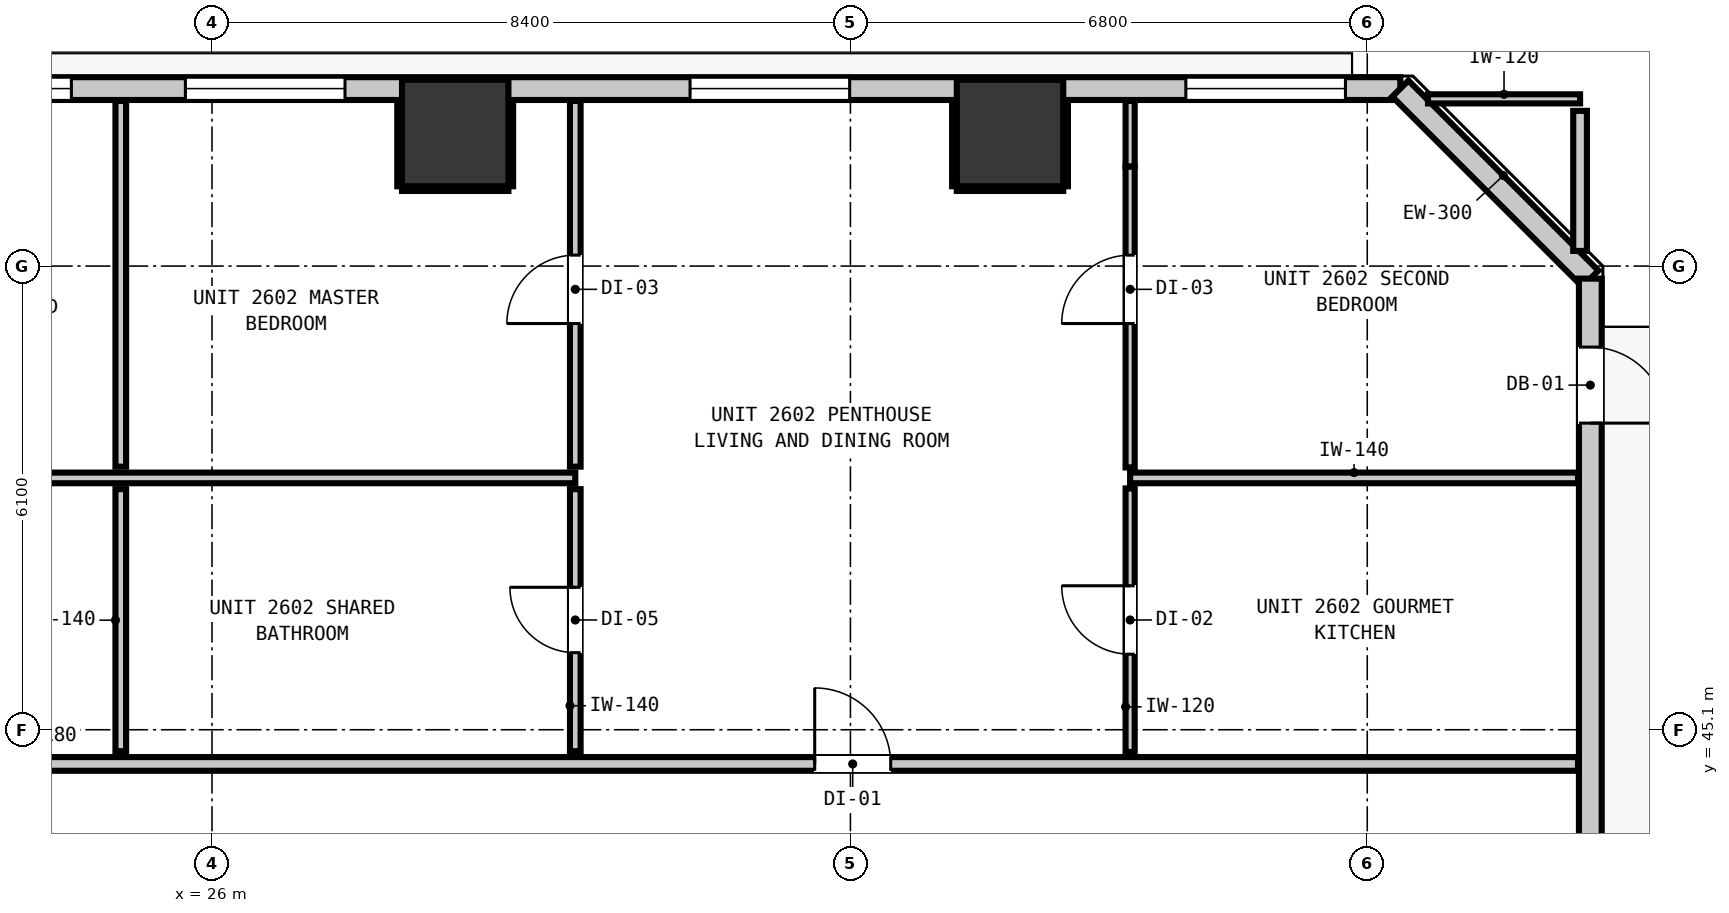
"""IFC4 building model, lengths in metres.
Left out: names, types, materials, properties, quantities, classifications, styles, units other than length and angle.
Written with IfcOpenShell. Run it as: python <this file> out.ifc"""

import sys

from ifc_helpers import new_model, si_unit, direction, frame, frame_2d, origin, origin_2d, place, context, subcontext, project, spatial, rectangle, extrude, element, fill, save


model = new_model("IFC4")
c1 = context("Model", 3, precision=1e-05, world=origin(), true_north=direction((0.0, 1.0)))
c2 = subcontext(c1, "Body", "Model", "MODEL_VIEW")
j1 = project(units=[si_unit("LENGTHUNIT", "METRE"), si_unit("PLANEANGLEUNIT", "RADIAN")], contexts=[c1])
p1 = place(None, origin())
s1 = spatial("IfcSite", under=j1, at=p1, CompositionType="ELEMENT")
p2 = place(p1, origin())
s2 = spatial("IfcBuilding", under=s1, at=p2, CompositionType="ELEMENT")
p3 = place(p2, frame((0.0, 0.0, 92.8)))
s3 = spatial("IfcBuildingStorey", under=s2, at=p3, CompositionType="ELEMENT", Elevation=92.8)
for number, where, z_axis, x_axis in (
    (1, (29.2, 52.95, 0.0), (0.0, 0.0, 1.0), (1.0, 0.0, 0.0)),
    (2, (36.5, 52.95, 0.0), (0.0, 0.0, 1.0), (1.0, 0.0, 0.0)),
):
    element("IfcColumn", number, at=place(p3, frame(where, z_axis=z_axis, x_axis=x_axis)), inside=s3, PredefinedType="COLUMN", context=c2, shape_type="SweptSolid", body=[
        extrude(rectangle(XDim=1.4, YDim=1.4, at=origin_2d()), origin(), (0.0, 0.0, 1.0), 3.32),
    ])
p4 = place(p3, frame((4.165, 53.535, 0.0), z_axis=(0.0, 0.0, 1.0), x_axis=(1.0, 0.0, 0.0)))
e3 = element("IfcWall", 3, at=p4, inside=s3, PredefinedType="STANDARD", context=c2, shape_type="SweptSolid", body=[
    extrude(rectangle(XDim=37.47, YDim=0.3, at=frame_2d((18.735, 0.0))), origin(), (0.0, 0.0, 1.0), 3.06),
])
p5 = place(p4, frame((0.901, 0.0, 0.0)))
e4 = element("IfcOpeningElement", 4, at=p5, cuts=e3, PredefinedType="OPENING", context=c2, shape_type="SweptSolid", body=[
    extrude(rectangle(XDim=1.0, YDim=2.15, at=frame_2d((0.5, 1.075))), frame((0.0, 0.16, 0.0), z_axis=(0.0, -1.0, 0.0), x_axis=(1.0, 0.0, 0.0)), (0.0, 0.0, 1.0), 0.32),
])
p6 = place(p4, frame((5.078, 0.0, 0.85)))
e5 = element("IfcOpeningElement", 5, at=p6, cuts=e3, PredefinedType="OPENING", context=c2, shape_type="SweptSolid", body=[
    extrude(rectangle(XDim=2.1, YDim=1.9, at=frame_2d((1.05, 0.95))), frame((0.0, 0.16, 0.0), z_axis=(0.0, -1.0, 0.0), x_axis=(1.0, 0.0, 0.0)), (0.0, 0.0, 1.0), 0.32),
])
p7 = place(p4, frame((2.286, 0.0, 0.85)))
e6 = element("IfcOpeningElement", 6, at=p7, cuts=e3, PredefinedType="OPENING", context=c2, shape_type="SweptSolid", body=[
    extrude(rectangle(XDim=1.05, YDim=1.65, at=frame_2d((0.525, 0.825))), frame((0.0, 0.16, 0.0), z_axis=(0.0, -1.0, 0.0), x_axis=(1.0, 0.0, 0.0)), (0.0, 0.0, 1.0), 0.32),
])
p8 = place(p4, frame((17.885, 0.0, 0.85)))
e7 = element("IfcOpeningElement", 7, at=p8, cuts=e3, PredefinedType="OPENING", context=c2, shape_type="SweptSolid", body=[
    extrude(rectangle(XDim=2.1, YDim=1.9, at=frame_2d((1.05, 0.95))), frame((0.0, 0.16, 0.0), z_axis=(0.0, -1.0, 0.0), x_axis=(1.0, 0.0, 0.0)), (0.0, 0.0, 1.0), 0.32),
])
p9 = place(p4, frame((28.125, 0.0, 0.85)))
e8 = element("IfcOpeningElement", 8, at=p9, cuts=e3, PredefinedType="OPENING", context=c2, shape_type="SweptSolid", body=[
    extrude(rectangle(XDim=2.1, YDim=1.9, at=frame_2d((1.05, 0.95))), frame((0.0, 0.16, 0.0), z_axis=(0.0, -1.0, 0.0), x_axis=(1.0, 0.0, 0.0)), (0.0, 0.0, 1.0), 0.32),
])
p10 = place(p4, frame((21.485, 0.0, 0.85)))
e9 = element("IfcOpeningElement", 9, at=p10, cuts=e3, PredefinedType="OPENING", context=c2, shape_type="SweptSolid", body=[
    extrude(rectangle(XDim=2.1, YDim=1.9, at=frame_2d((1.05, 0.95))), frame((0.0, 0.16, 0.0), z_axis=(0.0, -1.0, 0.0), x_axis=(1.0, 0.0, 0.0)), (0.0, 0.0, 1.0), 0.32),
])
p11 = place(p4, frame((34.648, 0.0, 0.85)))
e10 = element("IfcOpeningElement", 10, at=p11, cuts=e3, PredefinedType="OPENING", context=c2, shape_type="SweptSolid", body=[
    extrude(rectangle(XDim=2.1, YDim=1.9, at=frame_2d((1.05, 0.95))), frame((0.0, 0.16, 0.0), z_axis=(0.0, -1.0, 0.0), x_axis=(1.0, 0.0, 0.0)), (0.0, 0.0, 1.0), 0.32),
])
p12 = place(p3, frame((41.635, 53.535, 0.0), z_axis=(0.0, 0.0, 1.0), x_axis=(0.707106781187, -0.707106781187, 0.0)))
e11 = element("IfcWall", 11, at=p12, inside=s3, PredefinedType="STANDARD", context=c2, shape_type="SweptSolid", body=[
    extrude(rectangle(XDim=3.536, YDim=0.3, at=frame_2d((1.768, 0.0))), origin(), (0.0, 0.0, 1.0), 3.06),
])
p13 = place(p3, frame((44.135, 51.035, 0.0), z_axis=(0.0, 0.0, 1.0), x_axis=(0.0, -1.0, 0.0)))
e12 = element("IfcWall", 12, at=p13, inside=s3, PredefinedType="STANDARD", context=c2, shape_type="SweptSolid", body=[
    extrude(rectangle(XDim=34.67, YDim=0.3, at=frame_2d((17.335, 0.0))), origin(), (0.0, 0.0, 1.0), 3.06),
])
p14 = place(p13, frame((0.901, 0.0, 0.0)))
e13 = element("IfcOpeningElement", 13, at=p14, cuts=e12, PredefinedType="OPENING", context=c2, shape_type="SweptSolid", body=[
    extrude(rectangle(XDim=1.0, YDim=2.15, at=frame_2d((0.5, 1.075))), frame((0.0, 0.16, 0.0), z_axis=(0.0, -1.0, 0.0), x_axis=(1.0, 0.0, 0.0)), (0.0, 0.0, 1.0), 0.32),
])
p15 = place(p13, frame((32.083, 0.0, 0.85)))
e14 = element("IfcOpeningElement", 14, at=p15, cuts=e12, PredefinedType="OPENING", context=c2, shape_type="SweptSolid", body=[
    extrude(rectangle(XDim=2.1, YDim=1.9, at=frame_2d((1.05, 0.95))), frame((0.0, 0.16, 0.0), z_axis=(0.0, -1.0, 0.0), x_axis=(1.0, 0.0, 0.0)), (0.0, 0.0, 1.0), 0.32),
])
p16 = place(p13, frame((21.76, 0.0, 0.85)))
e15 = element("IfcOpeningElement", 15, at=p16, cuts=e12, PredefinedType="OPENING", context=c2, shape_type="SweptSolid", body=[
    extrude(rectangle(XDim=2.1, YDim=1.9, at=frame_2d((1.05, 0.95))), frame((0.0, 0.16, 0.0), z_axis=(0.0, -1.0, 0.0), x_axis=(1.0, 0.0, 0.0)), (0.0, 0.0, 1.0), 0.32),
])
p17 = place(p3, frame((1.827, 44.65, 0.0), z_axis=(0.0, 0.0, 1.0), x_axis=(1.0, 0.0, 0.0)))
e16 = element("IfcWall", 16, at=p17, inside=s3, PredefinedType="PARTITIONING", context=c2, shape_type="SweptSolid", body=[
    extrude(rectangle(XDim=42.146, YDim=0.18, at=frame_2d((21.073, 0.0))), origin(), (0.0, 0.0, 1.0), 3.06),
])
p18 = place(p17, frame((10.77, 0.0, 0.0)))
e17 = element("IfcOpeningElement", 17, at=p18, cuts=e16, PredefinedType="OPENING", context=c2, shape_type="SweptSolid", body=[
    extrude(rectangle(XDim=1.0, YDim=2.15, at=frame_2d((0.5, 1.075))), frame((0.0, 0.1, 0.0), z_axis=(0.0, -1.0, 0.0), x_axis=(1.0, 0.0, 0.0)), (0.0, 0.0, 1.0), 0.2),
])
p19 = place(p17, frame((32.103, 0.0, 0.0)))
e18 = element("IfcOpeningElement", 18, at=p19, cuts=e16, PredefinedType="OPENING", context=c2, shape_type="SweptSolid", body=[
    extrude(rectangle(XDim=1.0, YDim=2.15, at=frame_2d((0.5, 1.075))), frame((0.0, 0.1, 0.0), z_axis=(0.0, -1.0, 0.0), x_axis=(1.0, 0.0, 0.0)), (0.0, 0.0, 1.0), 0.2),
])
p20 = place(p3, frame((1.827, 48.413, 0.0), z_axis=(0.0, 0.0, 1.0), x_axis=(1.0, 0.0, 0.0)))
e19 = element("IfcWall", 19, at=p20, inside=s3, PredefinedType="PARTITIONING", context=c2, shape_type="SweptSolid", body=[
    extrude(rectangle(XDim=28.953, YDim=0.14, at=frame_2d((14.477, 0.0))), origin(), (0.0, 0.0, 1.0), 3.06),
])
p21 = place(p20, frame((10.82, 0.0, 0.0)))
e20 = element("IfcOpeningElement", 20, at=p21, cuts=e19, PredefinedType="OPENING", context=c2, shape_type="SweptSolid", body=[
    extrude(rectangle(XDim=0.9, YDim=2.1, at=frame_2d((0.45, 1.05))), frame((0.0, 0.08, 0.0), z_axis=(0.0, -1.0, 0.0), x_axis=(1.0, 0.0, 0.0)), (0.0, 0.0, 1.0), 0.16),
])
p22 = place(p3, frame((38.08, 48.413, 0.0), z_axis=(0.0, 0.0, 1.0), x_axis=(1.0, 0.0, 0.0)))
e21 = element("IfcWall", 21, at=p22, inside=s3, PredefinedType="PARTITIONING", context=c2, shape_type="SweptSolid", body=[
    extrude(rectangle(XDim=5.893, YDim=0.14, at=frame_2d((2.946, 0.0))), origin(), (0.0, 0.0, 1.0), 3.06),
])
p23 = place(p3, frame((41.999, 53.4, 0.0), z_axis=(0.0, 0.0, 1.0), x_axis=(1.0, 0.0, 0.0)))
e22 = element("IfcWall", 22, at=p23, inside=s3, PredefinedType="PARTITIONING", context=c2, shape_type="SweptSolid", body=[
    extrude(rectangle(XDim=2.001, YDim=0.12, at=frame_2d((1.0, 0.0))), origin(), (0.0, 0.0, 1.0), 3.06),
])
p24 = place(p3, frame((44.0, 51.399, 0.0), z_axis=(0.0, 0.0, 1.0), x_axis=(0.0, 1.0, 0.0)))
e23 = element("IfcWall", 23, at=p24, inside=s3, PredefinedType="PARTITIONING", context=c2, shape_type="SweptSolid", body=[
    extrude(rectangle(XDim=1.843, YDim=0.18, at=frame_2d((0.921, 0.0))), origin(), (0.0, 0.0, 1.0), 3.06),
])
p25 = place(p3, frame((24.8, 44.818, 0.0), z_axis=(0.0, 0.0, 1.0), x_axis=(0.0, 1.0, 0.0)))
e24 = element("IfcWall", 24, at=p25, inside=s3, PredefinedType="PARTITIONING", context=c2, shape_type="SweptSolid", body=[
    extrude(rectangle(XDim=3.447, YDim=0.14, at=frame_2d((1.723, 0.0))), origin(), (0.0, 0.0, 1.0), 3.06),
])
p26 = place(p3, frame((24.8, 48.561, 0.0), z_axis=(0.0, 0.0, 1.0), x_axis=(0.0, 1.0, 0.0)))
e25 = element("IfcWall", 25, at=p26, inside=s3, PredefinedType="PARTITIONING", context=c2, shape_type="SweptSolid", body=[
    extrude(rectangle(XDim=4.812, YDim=0.14, at=frame_2d((2.406, 0.0))), origin(), (0.0, 0.0, 1.0), 3.06),
])
p27 = place(p3, frame((30.78, 44.818, 0.0), z_axis=(0.0, 0.0, 1.0), x_axis=(0.0, 1.0, 0.0)))
e26 = element("IfcWall", 26, at=p27, inside=s3, PredefinedType="PARTITIONING", context=c2, shape_type="SweptSolid", body=[
    extrude(rectangle(XDim=3.447, YDim=0.14, at=frame_2d((1.723, 0.0))), origin(), (0.0, 0.0, 1.0), 3.06),
])
p28 = place(p27, frame((1.296, 0.0, 0.0)))
e27 = element("IfcOpeningElement", 27, at=p28, cuts=e26, PredefinedType="OPENING", context=c2, shape_type="SweptSolid", body=[
    extrude(rectangle(XDim=0.86, YDim=2.02, at=frame_2d((0.43, 1.01))), frame((0.0, 0.08, 0.0), z_axis=(0.0, -1.0, 0.0), x_axis=(1.0, 0.0, 0.0)), (0.0, 0.0, 1.0), 0.16),
])
p29 = place(p3, frame((30.78, 48.561, 0.0), z_axis=(0.0, 0.0, 1.0), x_axis=(0.0, 1.0, 0.0)))
e28 = element("IfcWall", 28, at=p29, inside=s3, PredefinedType="PARTITIONING", context=c2, shape_type="SweptSolid", body=[
    extrude(rectangle(XDim=4.812, YDim=0.14, at=frame_2d((2.406, 0.0))), origin(), (0.0, 0.0, 1.0), 3.06),
])
p30 = place(p29, frame((1.883, 0.0, 0.0)))
e29 = element("IfcOpeningElement", 29, at=p30, cuts=e28, PredefinedType="OPENING", context=c2, shape_type="SweptSolid", body=[
    extrude(rectangle(XDim=0.9, YDim=2.1, at=frame_2d((0.45, 1.05))), frame((0.0, 0.08, 0.0), z_axis=(0.0, -1.0, 0.0), x_axis=(1.0, 0.0, 0.0)), (0.0, 0.0, 1.0), 0.16),
])
p31 = place(p3, frame((38.08, 44.808, 0.0), z_axis=(0.0, 0.0, 1.0), x_axis=(0.0, 1.0, 0.0)))
e30 = element("IfcWall", 30, at=p31, inside=s3, PredefinedType="PARTITIONING", context=c2, shape_type="SweptSolid", body=[
    extrude(rectangle(XDim=3.467, YDim=0.12, at=frame_2d((1.733, 0.0))), origin(), (0.0, 0.0, 1.0), 3.06),
])
p32 = place(p31, frame((1.286, 0.0, 0.0)))
e31 = element("IfcOpeningElement", 31, at=p32, cuts=e30, PredefinedType="OPENING", context=c2, shape_type="SweptSolid", body=[
    extrude(rectangle(XDim=0.9, YDim=2.1, at=frame_2d((0.45, 1.05))), frame((0.0, 0.07, 0.0), z_axis=(0.0, -1.0, 0.0), x_axis=(1.0, 0.0, 0.0)), (0.0, 0.0, 1.0), 0.14),
])
p33 = place(p3, frame((38.08, 48.551, 0.0), z_axis=(0.0, 0.0, 1.0), x_axis=(0.0, 1.0, 0.0)))
e32 = element("IfcWall", 32, at=p33, inside=s3, PredefinedType="PARTITIONING", context=c2, shape_type="SweptSolid", body=[
    extrude(rectangle(XDim=3.96, YDim=0.12, at=frame_2d((1.98, 0.0))), origin(), (0.0, 0.0, 1.0), 2.445),
])
p34 = place(p33, frame((1.893, 0.0, 0.0)))
e33 = element("IfcOpeningElement", 33, at=p34, cuts=e32, PredefinedType="OPENING", context=c2, shape_type="SweptSolid", body=[
    extrude(rectangle(XDim=0.9, YDim=2.1, at=frame_2d((0.45, 1.05))), frame((0.0, 0.07, 0.0), z_axis=(0.0, -1.0, 0.0), x_axis=(1.0, 0.0, 0.0)), (0.0, 0.0, 1.0), 0.14),
])
p35 = place(p3, frame((38.08, 52.511, 0.0), z_axis=(0.0, 0.0, 1.0), x_axis=(0.0, 1.0, 0.0)))
e34 = element("IfcWall", 34, at=p35, inside=s3, PredefinedType="PARTITIONING", context=c2, shape_type="SweptSolid", body=[
    extrude(rectangle(XDim=0.862, YDim=0.12, at=frame_2d((0.431, 0.0))), origin(), (0.0, 0.0, 1.0), 3.06),
])
p36 = place(p3, frame((28.5, 52.218, 0.0), z_axis=(0.0, 0.0, 1.0), x_axis=(1.0, 0.0, 0.0)))
e35 = element("IfcWall", 35, at=p36, inside=s3, PredefinedType="PARTITIONING", context=c2, shape_type="SweptSolid", body=[
    extrude(rectangle(XDim=1.4, YDim=0.06, at=frame_2d((0.7, 0.0))), origin(), (0.0, 0.0, 1.0), 1.45),
])
for number, where, z_axis, x_axis in (
    (36, (28.468, 52.25, 0.0), (0.0, 0.0, 1.0), (0.0, 1.0, 0.0)),
    (37, (29.932, 52.25, 0.0), (0.0, 0.0, 1.0), (0.0, 1.0, 0.0)),
):
    element("IfcWall", number, at=place(p3, frame(where, z_axis=z_axis, x_axis=x_axis)), inside=s3, PredefinedType="PARTITIONING", context=c2, shape_type="SweptSolid", body=[
        extrude(rectangle(XDim=1.12, YDim=0.06, at=frame_2d((0.56, 0.0))), origin(), (0.0, 0.0, 1.0), 1.45),
    ])
p37 = place(p3, frame((35.8, 52.218, 0.0), z_axis=(0.0, 0.0, 1.0), x_axis=(1.0, 0.0, 0.0)))
e38 = element("IfcWall", 38, at=p37, inside=s3, PredefinedType="PARTITIONING", context=c2, shape_type="SweptSolid", body=[
    extrude(rectangle(XDim=1.4, YDim=0.06, at=frame_2d((0.7, 0.0))), origin(), (0.0, 0.0, 1.0), 1.45),
])
for number, where, z_axis, x_axis in (
    (39, (35.768, 52.25, 0.0), (0.0, 0.0, 1.0), (0.0, 1.0, 0.0)),
    (40, (37.232, 52.25, 0.0), (0.0, 0.0, 1.0), (0.0, 1.0, 0.0)),
):
    element("IfcWall", number, at=place(p3, frame(where, z_axis=z_axis, x_axis=x_axis)), inside=s3, PredefinedType="PARTITIONING", context=c2, shape_type="SweptSolid", body=[
        extrude(rectangle(XDim=1.12, YDim=0.06, at=frame_2d((0.56, 0.0))), origin(), (0.0, 0.0, 1.0), 1.45),
    ])
p38 = place(p14, origin())
e41 = element("IfcDoor", 41, at=p38, inside=s3, OperationType="SINGLE_SWING_RIGHT", PredefinedType="DOOR", context=c2, shape_type="SweptSolid", body=[
    extrude(rectangle(XDim=1.0, YDim=2.15, at=frame_2d((0.5, 1.075))), frame((0.0, 0.025, 0.0), z_axis=(0.0, -1.0, 0.0), x_axis=(1.0, 0.0, 0.0)), (0.0, 0.0, 1.0), 0.05),
])
fill(e13, e41)
p39 = place(p8, origin())
e42 = element("IfcWindow", 42, at=p39, inside=s3, PartitioningType="SINGLE_PANEL", PredefinedType="WINDOW", context=c2, shape_type="SweptSolid", body=[
    extrude(rectangle(XDim=2.1, YDim=1.9, at=frame_2d((1.05, 0.95))), frame((0.0, 0.03, 0.0), z_axis=(0.0, -1.0, 0.0), x_axis=(1.0, 0.0, 0.0)), (0.0, 0.0, 1.0), 0.06),
])
fill(e7, e42)
p40 = place(p9, origin())
e43 = element("IfcWindow", 43, at=p40, inside=s3, PartitioningType="SINGLE_PANEL", PredefinedType="WINDOW", context=c2, shape_type="SweptSolid", body=[
    extrude(rectangle(XDim=2.1, YDim=1.9, at=frame_2d((1.05, 0.95))), frame((0.0, 0.03, 0.0), z_axis=(0.0, -1.0, 0.0), x_axis=(1.0, 0.0, 0.0)), (0.0, 0.0, 1.0), 0.06),
])
fill(e8, e43)
p41 = place(p10, origin())
e44 = element("IfcWindow", 44, at=p41, inside=s3, PartitioningType="SINGLE_PANEL", PredefinedType="WINDOW", context=c2, shape_type="SweptSolid", body=[
    extrude(rectangle(XDim=2.1, YDim=1.9, at=frame_2d((1.05, 0.95))), frame((0.0, 0.03, 0.0), z_axis=(0.0, -1.0, 0.0), x_axis=(1.0, 0.0, 0.0)), (0.0, 0.0, 1.0), 0.06),
])
fill(e9, e44)
p42 = place(p11, origin())
e45 = element("IfcWindow", 45, at=p42, inside=s3, PartitioningType="SINGLE_PANEL", PredefinedType="WINDOW", context=c2, shape_type="SweptSolid", body=[
    extrude(rectangle(XDim=2.1, YDim=1.9, at=frame_2d((1.05, 0.95))), frame((0.0, 0.03, 0.0), z_axis=(0.0, -1.0, 0.0), x_axis=(1.0, 0.0, 0.0)), (0.0, 0.0, 1.0), 0.06),
])
fill(e10, e45)
p43 = place(p19, origin())
e46 = element("IfcDoor", 46, at=p43, inside=s3, OperationType="SINGLE_SWING_LEFT", PredefinedType="DOOR", context=c2, shape_type="SweptSolid", body=[
    extrude(rectangle(XDim=1.0, YDim=2.15, at=frame_2d((0.5, 1.075))), frame((0.0, 0.025, 0.0), z_axis=(0.0, -1.0, 0.0), x_axis=(1.0, 0.0, 0.0)), (0.0, 0.0, 1.0), 0.05),
])
fill(e18, e46)
p44 = place(p28, origin())
e47 = element("IfcDoor", 47, at=p44, inside=s3, OperationType="SINGLE_SWING_RIGHT", PredefinedType="DOOR", context=c2, shape_type="SweptSolid", body=[
    extrude(rectangle(XDim=0.86, YDim=2.02, at=frame_2d((0.43, 1.01))), frame((0.0, 0.025, 0.0), z_axis=(0.0, -1.0, 0.0), x_axis=(1.0, 0.0, 0.0)), (0.0, 0.0, 1.0), 0.05),
])
fill(e27, e47)
p45 = place(p30, origin())
e48 = element("IfcDoor", 48, at=p45, inside=s3, OperationType="SINGLE_SWING_LEFT", PredefinedType="DOOR", context=c2, shape_type="SweptSolid", body=[
    extrude(rectangle(XDim=0.9, YDim=2.1, at=frame_2d((0.45, 1.05))), frame((0.0, 0.025, 0.0), z_axis=(0.0, -1.0, 0.0), x_axis=(1.0, 0.0, 0.0)), (0.0, 0.0, 1.0), 0.05),
])
fill(e29, e48)
p46 = place(p32, origin())
e49 = element("IfcDoor", 49, at=p46, inside=s3, OperationType="SINGLE_SWING_RIGHT", PredefinedType="DOOR", context=c2, shape_type="SweptSolid", body=[
    extrude(rectangle(XDim=0.9, YDim=2.1, at=frame_2d((0.45, 1.05))), frame((0.0, 0.025, 0.0), z_axis=(0.0, -1.0, 0.0), x_axis=(1.0, 0.0, 0.0)), (0.0, 0.0, 1.0), 0.05),
])
fill(e31, e49)
p47 = place(p34, origin())
e50 = element("IfcDoor", 50, at=p47, inside=s3, OperationType="SINGLE_SWING_LEFT", PredefinedType="DOOR", context=c2, shape_type="SweptSolid", body=[
    extrude(rectangle(XDim=0.9, YDim=2.1, at=frame_2d((0.45, 1.05))), frame((0.0, 0.025, 0.0), z_axis=(0.0, -1.0, 0.0), x_axis=(1.0, 0.0, 0.0)), (0.0, 0.0, 1.0), 0.05),
])
fill(e33, e50)
save(model, sys.argv[1])
